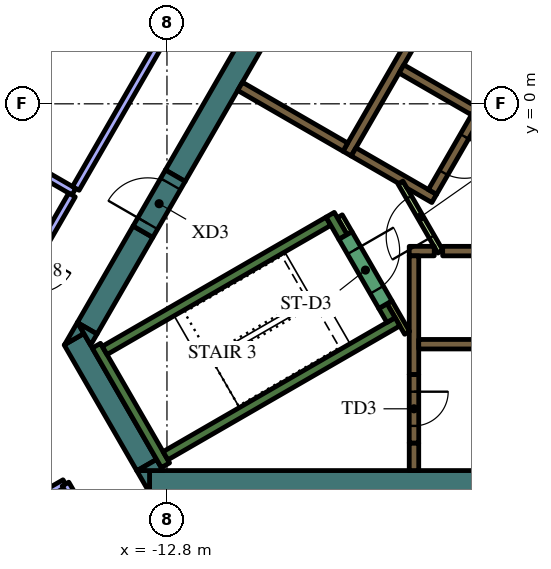
"""IFC4 building model, lengths in metres.
Left out: names, types, materials, properties, quantities, classifications, styles, units other than length and angle.
Written with IfcOpenShell. Run it as: python <this file> out.ifc"""

import sys

from ifc_helpers import new_model, si_unit, direction, frame, frame_2d, origin, place, context, subcontext, project, spatial, polyline, rectangle, outline, extrude, element, fill, save


model = new_model("IFC4")
c1 = context("Model", 3, precision=1e-05, world=origin(), true_north=direction((0.0, 1.0)))
c2 = subcontext(c1, "Body", "Model", "MODEL_VIEW")
j1 = project(units=[si_unit("LENGTHUNIT", "METRE"), si_unit("PLANEANGLEUNIT", "RADIAN")], contexts=[c1])
p1 = place(None, origin())
s1 = spatial("IfcSite", under=j1, at=p1, CompositionType="ELEMENT")
p2 = place(p1, origin())
s2 = spatial("IfcBuilding", under=s1, at=p2, CompositionType="ELEMENT")
p3 = place(p2, frame((0.0, 0.0, 313.2)))
s3 = spatial("IfcBuildingStorey", under=s2, at=p3, CompositionType="ELEMENT", Elevation=313.2)
p4 = place(p3, frame((8.904, -9.95, 0.0), z_axis=(0.0, 0.0, 1.0), x_axis=(-1.0, 0.0, 0.0)))
e1 = element("IfcWall", 1, at=p4, inside=s3, PredefinedType="SOLIDWALL", context=c2, shape_type="SweptSolid", body=[
    extrude(rectangle(XDim=22.161, YDim=0.6, at=frame_2d((11.081, 0.0))), origin(), (0.0, 0.0, 1.0), 4.2),
])
p5 = place(p3, origin())
e2 = element("IfcWall", 2, at=p5, inside=s3, PredefinedType="SOLIDWALL", context=c2, shape_type="SweptSolid", body=[
    extrude(outline(polyline([(-13.597, -9.65), (-13.259, -9.65), (-13.259, -10.236), (-13.597, -9.65)])), origin(), (0.0, 0.0, 1.0), 4.2),
])
p6 = place(p3, frame((-13.333, -9.506, 0.0), z_axis=(0.0, 0.0, 1.0), x_axis=(-0.500019073792, 0.866014391245, 0.0)))
e3 = element("IfcWall", 3, at=p6, inside=s3, PredefinedType="SOLIDWALL", context=c2, shape_type="SweptSolid", body=[
    extrude(rectangle(XDim=3.823, YDim=0.6, at=frame_2d((1.912, 0.0))), origin(), (0.0, 0.0, 1.0), 4.2),
])
e4 = element("IfcWall", 4, at=p5, inside=s3, PredefinedType="SOLIDWALL", context=c2, shape_type="SweptSolid", body=[
    extrude(outline(polyline([(-14.987, -6.043), (-15.493, -6.335), (-15.156, -5.75), (-14.987, -6.043)])), origin(), (0.0, 0.0, 1.0), 4.2),
])
e5 = element("IfcWall", 5, at=p5, inside=s3, PredefinedType="SOLIDWALL", context=c2, shape_type="SweptSolid", body=[
    extrude(outline(polyline([(-12.904, -9.65), (-13.58, -9.65), (-13.073, -9.357), (-12.904, -9.65)])), origin(), (0.0, 0.0, 1.0), 4.2),
])
p7 = place(p3, frame((-13.432, -3.364, 0.0), z_axis=(0.0, 0.0, 1.0), x_axis=(-0.499960127962, -0.866048422692, 0.0)))
e6 = element("IfcWall", 6, at=p7, inside=s3, PredefinedType="SOLIDWALL", context=c2, shape_type="SweptSolid", body=[
    extrude(rectangle(XDim=2.934, YDim=0.6, at=frame_2d((1.467, 0.0))), origin(), (0.0, 0.0, 1.0), 4.2),
])
e7 = element("IfcWall", 7, at=p5, inside=s3, PredefinedType="SOLIDWALL", context=c2, shape_type="SweptSolid", body=[
    extrude(outline(polyline([(-14.809, -6.35), (-15.147, -5.764), (-14.64, -6.057), (-14.809, -6.35)])), origin(), (0.0, 0.0, 1.0), 4.2),
])
p8 = place(p3, frame((-12.582, -1.892, 0.0), z_axis=(0.0, 0.0, 1.0), x_axis=(0.500003640647, 0.866023301845, 0.0)))
e8 = element("IfcWall", 8, at=p8, inside=s3, PredefinedType="SOLIDWALL", context=c2, shape_type="SweptSolid", body=[
    extrude(rectangle(XDim=15.858, YDim=0.6, at=frame_2d((7.929, 0.0))), origin(), (0.0, 0.0, 1.0), 4.2),
])
p9 = place(p3, frame((-12.84, -9.511, 0.0), z_axis=(0.0, 0.0, 1.0), x_axis=(-0.499997733992, 0.866026712061, 0.0)))
e9 = element("IfcWall", 9, at=p9, inside=s3, PredefinedType="SOLIDWALL", context=c2, shape_type="SweptSolid", body=[
    extrude(rectangle(XDim=3.634, YDim=0.25, at=frame_2d((1.817, 0.0))), origin(), (0.0, 0.0, 1.0), 4.2),
])
p10 = place(p3, frame((-14.44, -6.49, 0.0), z_axis=(0.0, 0.0, 1.0), x_axis=(0.866022966069, 0.500004222222, 0.0)))
e10 = element("IfcWall", 10, at=p10, inside=s3, PredefinedType="SOLIDWALL", context=c2, shape_type="SweptSolid", body=[
    extrude(rectangle(XDim=6.8, YDim=0.25, at=frame_2d((3.4, 0.0))), origin(), (0.0, 0.0, 1.0), 4.2),
])
p11 = place(p3, frame((-8.168, -3.503, 0.0), z_axis=(0.0, 0.0, 1.0), x_axis=(-0.499952099219, 0.866053057547, 0.0)))
e11 = element("IfcWall", 11, at=p11, inside=s3, PredefinedType="SOLIDWALL", context=c2, shape_type="SweptSolid", body=[
    extrude(rectangle(XDim=0.675, YDim=0.25, at=frame_2d((0.337, 0.0))), origin(), (0.0, 0.0, 1.0), 4.2),
])
p12 = place(p3, frame((-12.84, -9.261, 0.0), z_axis=(0.0, 0.0, 1.0), x_axis=(0.866016039709, 0.500016218704, 0.0)))
e12 = element("IfcWall", 12, at=p12, inside=s3, PredefinedType="SOLIDWALL", context=c2, shape_type="SweptSolid", body=[
    extrude(rectangle(XDim=7.05, YDim=0.25, at=frame_2d((3.525, 0.0))), origin(), (0.0, 0.0, 1.0), 4.2),
])
p13 = place(p3, frame((-6.905, -5.69, 0.0), z_axis=(0.0, 0.0, 1.0), x_axis=(-0.500402024738, 0.865793170242, 0.0)))
e13 = element("IfcWall", 13, at=p13, inside=s3, PredefinedType="SOLIDWALL", context=c2, shape_type="SweptSolid", body=[
    extrude(rectangle(XDim=0.425, YDim=0.25, at=frame_2d((0.212, 0.0))), origin(), (0.0, 0.0, 1.0), 4.2),
])
p14 = place(p3, frame((-5.545, -3.875, 0.0), z_axis=(0.0, 0.0, 1.0), x_axis=(1.0, 0.0, 0.0)))
e14 = element("IfcWall", 14, at=p14, inside=s3, PredefinedType="SOLIDWALL", context=c2, shape_type="SweptSolid", body=[
    extrude(rectangle(XDim=11.97, YDim=0.25, at=frame_2d((5.985, 0.0))), origin(), (0.0, 0.0, 1.0), 4.2),
])
p15 = place(p3, frame((-6.425, -3.875, 0.0), z_axis=(0.0, 0.0, 1.0), x_axis=(1.0, 0.0, 0.0)))
e15 = element("IfcWall", 15, at=p15, inside=s3, PredefinedType="SOLIDWALL", context=c2, shape_type="SweptSolid", body=[
    extrude(rectangle(XDim=0.658, YDim=0.25, at=frame_2d((0.329, 0.0))), origin(), (0.0, 0.0, 1.0), 4.2),
])
p16 = place(p3, frame((-6.3, -7.125, 0.0), z_axis=(0.0, 0.0, 1.0), x_axis=(0.0, 1.0, 0.0)))
e16 = element("IfcWall", 16, at=p16, inside=s3, PredefinedType="SOLIDWALL", context=c2, shape_type="SweptSolid", body=[
    extrude(rectangle(XDim=3.125, YDim=0.25, at=frame_2d((1.562, 0.0))), origin(), (0.0, 0.0, 1.0), 4.2),
])
p17 = place(p3, frame((-6.3, -8.925, 0.0), z_axis=(0.0, 0.0, 1.0), x_axis=(0.0, -1.0, 0.0)))
e17 = element("IfcWall", 17, at=p17, inside=s3, PredefinedType="SOLIDWALL", context=c2, shape_type="SweptSolid", body=[
    extrude(rectangle(XDim=0.725, YDim=0.25, at=frame_2d((0.363, 0.0))), origin(), (0.0, 0.0, 1.0), 4.2),
])
p18 = place(p3, frame((-8.06, -1.311, 0.0), z_axis=(0.0, 0.0, 1.0), x_axis=(0.50000273126, 0.866023826885, 0.0)))
e18 = element("IfcWall", 18, at=p18, inside=s3, PredefinedType="SOLIDWALL", context=c2, shape_type="SweptSolid", body=[
    extrude(rectangle(XDim=10.33, YDim=0.25, at=frame_2d((5.165, 0.0))), origin(), (0.0, 0.0, 1.0), 4.2),
])
p19 = place(p3, frame((-4.724, -0.182, 0.0), z_axis=(0.0, 0.0, 1.0), x_axis=(-0.866008176907, 0.50002983664, 0.0)))
e19 = element("IfcWall", 19, at=p19, inside=s3, PredefinedType="SOLIDWALL", context=c2, shape_type="SweptSolid", body=[
    extrude(rectangle(XDim=2.2, YDim=0.25, at=frame_2d((1.1, 0.0))), origin(), (0.0, 0.0, 1.0), 4.2),
])
e20 = element("IfcWall", 20, at=p5, inside=s3, PredefinedType="SOLIDWALL", context=c2, shape_type="SweptSolid", body=[
    extrude(outline(polyline([(-5.922, -2.257), (-5.922, -2.257), (-5.705, -2.382), (-5.83, -2.598), (-6.483, -2.221), (-6.591, -2.033), (-6.591, -2.033), (-6.7, -2.096), (-7.952, -1.373), (-7.827, -1.156), (-5.922, -2.257)])), origin(), (0.0, 0.0, 1.0), 4.2),
])
p20 = place(p3, frame((-8.106, -1.14, 0.0), z_axis=(0.0, 0.0, 1.0), x_axis=(-0.866008981251, 0.500028443584, 0.0)))
e21 = element("IfcWall", 21, at=p20, inside=s3, PredefinedType="SOLIDWALL", context=c2, shape_type="SweptSolid", body=[
    extrude(rectangle(XDim=3.2, YDim=0.25, at=frame_2d((1.6, 0.0))), origin(), (0.0, 0.0, 1.0), 4.2),
])
p21 = place(p3, frame((-8.252, -2.958, 0.0), z_axis=(0.0, 0.0, 1.0), x_axis=(0.500174715838, -0.865924508047, 0.0)))
e22 = element("IfcWall", 22, at=p21, inside=s3, PredefinedType="PARTITIONING", context=c2, shape_type="SweptSolid", body=[
    extrude(rectangle(XDim=0.514, YDim=0.15, at=frame_2d((0.257, 0.0))), origin(), (0.0, 0.0, 1.0), 3.55),
])
p22 = place(p3, frame((-6.48, -6.027, 0.0), z_axis=(0.0, 0.0, 1.0), x_axis=(-0.499927229454, 0.866067413802, 0.0)))
e23 = element("IfcWall", 23, at=p22, inside=s3, PredefinedType="PARTITIONING", context=c2, shape_type="SweptSolid", body=[
    extrude(rectangle(XDim=0.929, YDim=0.15, at=frame_2d((0.464, 0.0))), origin(), (0.0, 0.0, 1.0), 4.2),
])
p23 = place(p3, frame((-6.175, -6.325, 0.0), z_axis=(0.0, 0.0, 1.0), x_axis=(1.0, 0.0, 0.0)))
e24 = element("IfcWall", 24, at=p23, inside=s3, PredefinedType="SOLIDWALL", context=c2, shape_type="SweptSolid", body=[
    extrude(rectangle(XDim=12.35, YDim=0.25, at=frame_2d((6.175, 0.0))), origin(), (0.0, 0.0, 1.0), 4.2),
])
p24 = place(p23, frame((3.205, 0.0, 0.0)))
e25 = element("IfcOpeningElement", 25, at=p24, cuts=e24, PredefinedType="OPENING", context=c2, shape_type="SweptSolid", body=[
    extrude(rectangle(XDim=0.9, YDim=2.1, at=frame_2d((0.45, 1.05))), frame((0.0, 0.135, 0.0), z_axis=(0.0, -1.0, 0.0), x_axis=(1.0, 0.0, 0.0)), (0.0, 0.0, 1.0), 0.27),
])
p25 = place(p23, frame((8.145, 0.0, 0.0)))
e26 = element("IfcOpeningElement", 26, at=p25, cuts=e24, PredefinedType="OPENING", context=c2, shape_type="SweptSolid", body=[
    extrude(rectangle(XDim=1.1, YDim=2.1, at=frame_2d((0.55, 1.05))), frame((0.0, 0.135, 0.0), z_axis=(0.0, -1.0, 0.0), x_axis=(1.0, 0.0, 0.0)), (0.0, 0.0, 1.0), 0.27),
])
p26 = place(p23, frame((10.665, 0.0, 0.0)))
e27 = element("IfcOpeningElement", 27, at=p26, cuts=e24, PredefinedType="OPENING", context=c2, shape_type="SweptSolid", body=[
    extrude(rectangle(XDim=1.1, YDim=2.1, at=frame_2d((0.55, 1.05))), frame((0.0, 0.135, 0.0), z_axis=(0.0, -1.0, 0.0), x_axis=(1.0, 0.0, 0.0)), (0.0, 0.0, 1.0), 0.27),
])
p27 = place(p3, frame((-0.898, 6.194, 0.0), z_axis=(0.0, 0.0, 1.0), x_axis=(-0.499996202215, -0.866027596426, 0.0)))
e28 = element("IfcWall", 28, at=p27, inside=s3, PredefinedType="SOLIDWALL", context=c2, shape_type="SweptSolid", body=[
    extrude(rectangle(XDim=9.83, YDim=0.25, at=frame_2d((4.915, 0.0))), origin(), (0.0, 0.0, 1.0), 4.2),
])
p28 = place(p27, frame((0.585, 0.0, 0.0)))
e29 = element("IfcOpeningElement", 29, at=p28, cuts=e28, PredefinedType="OPENING", context=c2, shape_type="SweptSolid", body=[
    extrude(rectangle(XDim=1.1, YDim=2.1, at=frame_2d((0.55, 1.05))), frame((0.0, 0.135, 0.0), z_axis=(0.0, -1.0, 0.0), x_axis=(1.0, 0.0, 0.0)), (0.0, 0.0, 1.0), 0.27),
])
p29 = place(p27, frame((3.105, 0.0, 0.0)))
e30 = element("IfcOpeningElement", 30, at=p29, cuts=e28, PredefinedType="OPENING", context=c2, shape_type="SweptSolid", body=[
    extrude(rectangle(XDim=1.1, YDim=2.1, at=frame_2d((0.55, 1.05))), frame((0.0, 0.135, 0.0), z_axis=(0.0, -1.0, 0.0), x_axis=(1.0, 0.0, 0.0)), (0.0, 0.0, 1.0), 0.27),
])
p30 = place(p27, frame((5.625, 0.0, 0.0)))
e31 = element("IfcOpeningElement", 31, at=p30, cuts=e28, PredefinedType="OPENING", context=c2, shape_type="SweptSolid", body=[
    extrude(rectangle(XDim=1.1, YDim=2.1, at=frame_2d((0.55, 1.05))), frame((0.0, 0.135, 0.0), z_axis=(0.0, -1.0, 0.0), x_axis=(1.0, 0.0, 0.0)), (0.0, 0.0, 1.0), 0.27),
])
p31 = place(p27, frame((8.145, 0.0, 0.0)))
e32 = element("IfcOpeningElement", 32, at=p31, cuts=e28, PredefinedType="OPENING", context=c2, shape_type="SweptSolid", body=[
    extrude(rectangle(XDim=1.1, YDim=2.1, at=frame_2d((0.55, 1.05))), frame((0.0, 0.135, 0.0), z_axis=(0.0, -1.0, 0.0), x_axis=(1.0, 0.0, 0.0)), (0.0, 0.0, 1.0), 0.27),
])
p32 = place(p3, frame((-8.103, -3.466, 0.0), z_axis=(0.0, 0.0, 1.0), x_axis=(0.500078061341, -0.865980330357, 0.0)))
e33 = element("IfcWall", 33, at=p32, inside=s3, PredefinedType="SOLIDWALL", context=c2, shape_type="SweptSolid", body=[
    extrude(rectangle(XDim=2.1, YDim=0.4, at=frame_2d((1.05, 0.0))), origin(), (0.0, 0.0, 1.0), 4.2),
])
p33 = place(p32, frame((0.45, 0.0, 0.0)))
e34 = element("IfcOpeningElement", 34, at=p33, cuts=e33, PredefinedType="OPENING", context=c2, shape_type="SweptSolid", body=[
    extrude(rectangle(XDim=1.2, YDim=2.1, at=frame_2d((0.6, 1.05))), frame((0.0, 0.21, 0.0), z_axis=(0.0, -1.0, 0.0), x_axis=(1.0, 0.0, 0.0)), (0.0, 0.0, 1.0), 0.42),
])
p34 = place(p3, frame((-6.3, -7.125, 0.0), z_axis=(0.0, 0.0, 1.0), x_axis=(0.0, -1.0, 0.0)))
e35 = element("IfcWall", 35, at=p34, inside=s3, PredefinedType="SOLIDWALL", context=c2, shape_type="SweptSolid", body=[
    extrude(rectangle(XDim=1.8, YDim=0.25, at=frame_2d((0.9, 0.0))), origin(), (0.0, 0.0, 1.0), 4.2),
])
p35 = place(p34, frame((0.45, 0.0, 0.0)))
e36 = element("IfcOpeningElement", 36, at=p35, cuts=e35, PredefinedType="OPENING", context=c2, shape_type="SweptSolid", body=[
    extrude(rectangle(XDim=0.9, YDim=2.1, at=frame_2d((0.45, 1.05))), frame((0.0, 0.135, 0.0), z_axis=(0.0, -1.0, 0.0), x_axis=(1.0, 0.0, 0.0)), (0.0, 0.0, 1.0), 0.27),
])
p36 = place(p3, frame((-5.606, -3.89, 0.0), z_axis=(0.0, 0.0, 1.0), x_axis=(-0.500027713859, 0.866009402589, 0.0)))
e37 = element("IfcWall", 37, at=p36, inside=s3, PredefinedType="PARTITIONING", context=c2, shape_type="SweptSolid", body=[
    extrude(rectangle(XDim=2.1, YDim=0.15, at=frame_2d((1.05, 0.0))), origin(), (0.0, 0.0, 1.0), 3.55),
])
p37 = place(p36, frame((0.45, 0.0, 0.0)))
e38 = element("IfcOpeningElement", 38, at=p37, cuts=e37, PredefinedType="OPENING", context=c2, shape_type="SweptSolid", body=[
    extrude(rectangle(XDim=1.2, YDim=2.1, at=frame_2d((0.6, 1.05))), frame((0.0, 0.085, 0.0), z_axis=(0.0, -1.0, 0.0), x_axis=(1.0, 0.0, 0.0)), (0.0, 0.0, 1.0), 0.17),
])
p38 = place(p3, frame((-13.432, -3.364, 0.0), z_axis=(0.0, 0.0, 1.0), x_axis=(0.500062241894, 0.865989465428, 0.0)))
e39 = element("IfcWall", 39, at=p38, inside=s3, PredefinedType="SOLIDWALL", context=c2, shape_type="SweptSolid", body=[
    extrude(rectangle(XDim=1.7, YDim=0.6, at=frame_2d((0.85, 0.0))), origin(), (0.0, 0.0, 1.0), 4.2),
])
p39 = place(p38, frame((0.25, 0.0, 0.0)))
e40 = element("IfcOpeningElement", 40, at=p39, cuts=e39, PredefinedType="OPENING", context=c2, shape_type="SweptSolid", body=[
    extrude(rectangle(XDim=1.2, YDim=2.1, at=frame_2d((0.6, 1.05))), frame((0.0, 0.31, 0.0), z_axis=(0.0, -1.0, 0.0), x_axis=(1.0, 0.0, 0.0)), (0.0, 0.0, 1.0), 0.62),
])
p40 = place(p3, frame((-15.249, -2.312, 0.0), z_axis=(0.0, 0.0, 1.0), x_axis=(-0.866053113424, 0.499952002425, 0.0)))
e41 = element("IfcWall", 41, at=p40, inside=s3, PredefinedType="PARTITIONING", context=c2, shape_type="SweptSolid", body=[
    extrude(rectangle(XDim=3.161, YDim=0.2, at=frame_2d((1.581, 0.0))), origin(), (0.0, 0.0, 1.0), 3.55),
])
p41 = place(p3, frame((-12.701, 2.102, 0.0), z_axis=(0.0, 0.0, 1.0), x_axis=(-0.499974782844, -0.866039962427, 0.0)))
e42 = element("IfcWall", 42, at=p41, inside=s3, PredefinedType="PARTITIONING", context=c2, shape_type="SweptSolid", body=[
    extrude(rectangle(XDim=4.997, YDim=0.2, at=frame_2d((2.499, 0.0))), origin(), (0.0, 0.0, 1.0), 3.55),
])
p42 = place(p3, frame((-15.299, -2.399, 0.0), z_axis=(0.0, 0.0, 1.0), x_axis=(-0.49998958839, -0.866031414847, 0.0)))
e43 = element("IfcWall", 43, at=p42, inside=s3, PredefinedType="PARTITIONING", context=c2, shape_type="SweptSolid", body=[
    extrude(rectangle(XDim=4.562, YDim=0.2, at=frame_2d((2.281, 0.0))), origin(), (0.0, 0.0, 1.0), 3.55),
])
p43 = place(p42, frame((1.8, 0.0, 0.0)))
e44 = element("IfcOpeningElement", 44, at=p43, cuts=e43, PredefinedType="OPENING", context=c2, shape_type="SweptSolid", body=[
    extrude(rectangle(XDim=1.0, YDim=2.1, at=frame_2d((0.5, 1.05))), frame((0.0, 0.11, 0.0), z_axis=(0.0, -1.0, 0.0), x_axis=(1.0, 0.0, 0.0)), (0.0, 0.0, 1.0), 0.22),
])
p44 = place(p3, frame((-17.364, -11.064, 0.0), z_axis=(0.0, 0.0, 1.0), x_axis=(0.866018827591, 0.500011390128, 0.0)))
e45 = element("IfcWall", 45, at=p44, inside=s3, PredefinedType="PARTITIONING", context=c2, shape_type="SweptSolid", body=[
    extrude(rectangle(XDim=2.17, YDim=0.2, at=frame_2d((1.085, 0.0))), origin(), (0.0, 0.0, 1.0), 3.55),
])
p45 = place(p3, frame((-15.47, -10.005, 0.0), z_axis=(0.0, 0.0, 1.0), x_axis=(0.500053625724, -0.865994440744, 0.0)))
e46 = element("IfcWall", 46, at=p45, inside=s3, PredefinedType="PARTITIONING", context=c2, shape_type="SweptSolid", body=[
    extrude(rectangle(XDim=2.361, YDim=0.2, at=frame_2d((1.181, 0.0))), origin(), (0.0, 0.0, 1.0), 3.55),
])
p46 = place(p31, origin())
e47 = element("IfcDoor", 47, at=p46, inside=s3, OperationType="DOUBLE_DOOR_SLIDING", PredefinedType="DOOR", context=c2, shape_type="SweptSolid", body=[
    extrude(rectangle(XDim=1.1, YDim=2.1, at=frame_2d((0.55, 1.05))), frame((0.0, 0.025, 0.0), z_axis=(0.0, -1.0, 0.0), x_axis=(1.0, 0.0, 0.0)), (0.0, 0.0, 1.0), 0.05),
])
fill(e32, e47)
p47 = place(p33, origin())
e48 = element("IfcDoor", 48, at=p47, inside=s3, OperationType="SINGLE_SWING_LEFT", PredefinedType="DOOR", context=c2, shape_type="SweptSolid", body=[
    extrude(rectangle(XDim=1.2, YDim=2.1, at=frame_2d((0.6, 1.05))), frame((0.0, 0.025, 0.0), z_axis=(0.0, -1.0, 0.0), x_axis=(1.0, 0.0, 0.0)), (0.0, 0.0, 1.0), 0.05),
])
fill(e34, e48)
p48 = place(p35, origin())
e49 = element("IfcDoor", 49, at=p48, inside=s3, OperationType="SINGLE_SWING_LEFT", PredefinedType="DOOR", context=c2, shape_type="SweptSolid", body=[
    extrude(rectangle(XDim=0.9, YDim=2.1, at=frame_2d((0.45, 1.05))), frame((0.0, 0.025, 0.0), z_axis=(0.0, -1.0, 0.0), x_axis=(1.0, 0.0, 0.0)), (0.0, 0.0, 1.0), 0.05),
])
fill(e36, e49)
p49 = place(p37, origin())
e50 = element("IfcDoor", 50, at=p49, inside=s3, OperationType="SINGLE_SWING_LEFT", PredefinedType="DOOR", context=c2, shape_type="SweptSolid", body=[
    extrude(rectangle(XDim=1.2, YDim=2.1, at=frame_2d((0.6, 1.05))), frame((0.0, 0.025, 0.0), z_axis=(0.0, -1.0, 0.0), x_axis=(1.0, 0.0, 0.0)), (0.0, 0.0, 1.0), 0.05),
])
fill(e38, e50)
p50 = place(p39, origin())
e51 = element("IfcDoor", 51, at=p50, inside=s3, OperationType="SINGLE_SWING_LEFT", PredefinedType="DOOR", context=c2, shape_type="SweptSolid", body=[
    extrude(rectangle(XDim=1.2, YDim=2.1, at=frame_2d((0.6, 1.05))), frame((0.0, 0.025, 0.0), z_axis=(0.0, -1.0, 0.0), x_axis=(1.0, 0.0, 0.0)), (0.0, 0.0, 1.0), 0.05),
])
fill(e40, e51)
save(model, sys.argv[1])
